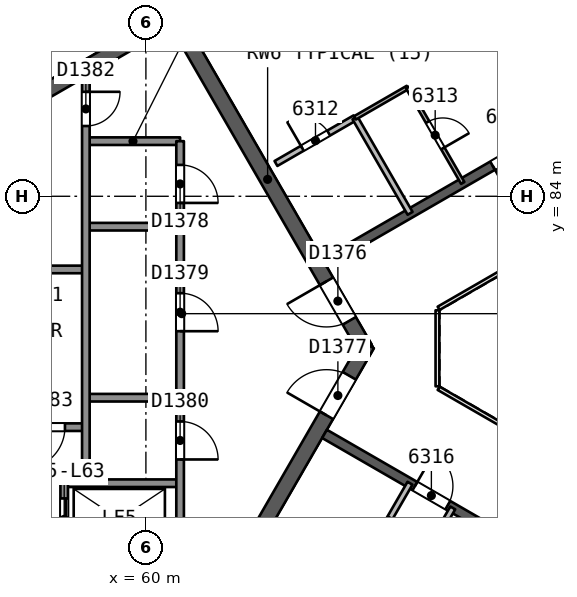
"""IFC4 building model, lengths in metres.
Left out: names, types, materials, properties, quantities, classifications, styles, units other than length and angle.
Written with IfcOpenShell. Run it as: python <this file> out.ifc"""

import sys

from ifc_helpers import new_model, si_unit, direction, frame, frame_2d, origin, place, context, subcontext, project, spatial, rectangle, extrude, element, fill, save


model = new_model("IFC4")
c1 = context("Model", 3, precision=1e-05, world=origin(), true_north=direction((0.0, 1.0)))
c2 = subcontext(c1, "Body", "Model", "MODEL_VIEW")
j1 = project(units=[si_unit("LENGTHUNIT", "METRE"), si_unit("PLANEANGLEUNIT", "RADIAN")], contexts=[c1])
p1 = place(None, origin())
s1 = spatial("IfcSite", under=j1, at=p1, CompositionType="ELEMENT")
p2 = place(p1, origin())
s2 = spatial("IfcBuilding", under=s1, at=p2, CompositionType="ELEMENT")
p3 = place(p2, frame((0.0, 0.0, 259.0)))
s3 = spatial("IfcBuildingStorey", under=s2, at=p3, CompositionType="ELEMENT", Elevation=259.0)
p4 = place(p3, frame((65.769, 80.0, 0.0), z_axis=(0.0, 0.0, 1.0), x_axis=(-0.50000177223, 0.866024380585, 0.0)))
e1 = element("IfcWall", 1, at=p4, inside=s3, PredefinedType="SHEAR", context=c2, shape_type="SweptSolid", body=[
    extrude(rectangle(XDim=10.265, YDim=0.4, at=frame_2d((5.132, 0.0))), origin(), (0.0, 0.0, 1.0), 3.7),
])
p5 = place(p4, frame((0.834, 0.0, 0.0)))
e2 = element("IfcOpeningElement", 2, at=p5, cuts=e1, PredefinedType="OPENING", context=c2, shape_type="SweptSolid", body=[
    extrude(rectangle(XDim=1.2, YDim=2.1, at=frame_2d((0.6, 1.05))), frame((0.0, 0.21, 0.0), z_axis=(0.0, -1.0, 0.0), x_axis=(1.0, 0.0, 0.0)), (0.0, 0.0, 1.0), 0.421),
])
p6 = place(p3, frame((60.737, 88.716, 0.0), z_axis=(0.0, 0.0, 1.0), x_axis=(-0.866028812667, -0.499994095595, 0.0)))
e3 = element("IfcWall", 3, at=p6, inside=s3, PredefinedType="SHEAR", context=c2, shape_type="SweptSolid", body=[
    extrude(rectangle(XDim=14.134, YDim=0.4, at=frame_2d((7.067, 0.0))), origin(), (0.0, 0.0, 1.0), 3.7),
])
p7 = place(p3, frame((48.597, 78.293, 0.0), z_axis=(0.0, 0.0, 1.0), x_axis=(0.866026024469, -0.499998924941, 0.0)))
e4 = element("IfcWall", 4, at=p7, inside=s3, PredefinedType="SHEAR", context=c2, shape_type="SweptSolid", body=[
    extrude(rectangle(XDim=14.218, YDim=0.4, at=frame_2d((7.109, 0.0))), origin(), (0.0, 0.0, 1.0), 3.7),
])
p8 = place(p3, frame((60.737, 71.284, 0.0), z_axis=(0.0, 0.0, 1.0), x_axis=(0.50000547566, 0.866022242388, 0.0)))
e5 = element("IfcWall", 5, at=p8, inside=s3, PredefinedType="SHEAR", context=c2, shape_type="SweptSolid", body=[
    extrude(rectangle(XDim=10.18, YDim=0.4, at=frame_2d((5.09, 0.0))), origin(), (0.0, 0.0, 1.0), 3.7),
])
p9 = place(p8, frame((8.03, 0.0, 0.0)))
e6 = element("IfcOpeningElement", 6, at=p9, cuts=e5, PredefinedType="OPENING", context=c2, shape_type="SweptSolid", body=[
    extrude(rectangle(XDim=1.2, YDim=2.1, at=frame_2d((0.6, 1.05))), frame((0.0, 0.21, 0.0), z_axis=(0.0, -1.0, 0.0), x_axis=(1.0, 0.0, 0.0)), (0.0, 0.0, 1.0), 0.421),
])
p10 = place(p3, frame((78.2, 90.046, 0.0), z_axis=(0.0, 0.0, 1.0), x_axis=(-0.866026492143, -0.499998114903, 0.0)))
e7 = element("IfcWall", 7, at=p10, inside=s3, PredefinedType="SHEAR", context=c2, shape_type="SweptSolid", body=[
    extrude(rectangle(XDim=15.588, YDim=0.25, at=frame_2d((7.794, 0.0))), origin(), (0.0, 0.0, 1.0), 3.3),
])
p11 = place(p10, frame((5.887, 0.0, 0.0)))
e8 = element("IfcOpeningElement", 8, at=p11, cuts=e7, PredefinedType="OPENING", context=c2, shape_type="SweptSolid", body=[
    extrude(rectangle(XDim=1.0, YDim=2.1, at=frame_2d((0.5, 1.05))), frame((0.0, 0.135, 0.0), z_axis=(0.0, -1.0, 0.0), x_axis=(1.0, 0.0, 0.0)), (0.0, 0.0, 1.0), 0.271),
])
p12 = place(p10, frame((9.481, 0.0, 0.0)))
e9 = element("IfcOpeningElement", 9, at=p12, cuts=e7, PredefinedType="OPENING", context=c2, shape_type="SweptSolid", body=[
    extrude(rectangle(XDim=1.0, YDim=2.1, at=frame_2d((0.5, 1.05))), frame((0.0, 0.135, 0.0), z_axis=(0.0, -1.0, 0.0), x_axis=(1.0, 0.0, 0.0)), (0.0, 0.0, 1.0), 0.271),
])
p13 = place(p3, frame((64.7, 77.748, 0.0), z_axis=(0.0, 0.0, 1.0), x_axis=(0.866026492143, -0.499998114903, 0.0)))
e10 = element("IfcWall", 10, at=p13, inside=s3, PredefinedType="SHEAR", context=c2, shape_type="SweptSolid", body=[
    extrude(rectangle(XDim=15.588, YDim=0.25, at=frame_2d((7.794, 0.0))), origin(), (0.0, 0.0, 1.0), 3.3),
])
p14 = place(p13, frame((2.747, 0.0, 0.0)))
e11 = element("IfcOpeningElement", 11, at=p14, cuts=e10, PredefinedType="OPENING", context=c2, shape_type="SweptSolid", body=[
    extrude(rectangle(XDim=1.0, YDim=2.1, at=frame_2d((0.5, 1.05))), frame((0.0, 0.135, 0.0), z_axis=(0.0, -1.0, 0.0), x_axis=(1.0, 0.0, 0.0)), (0.0, 0.0, 1.0), 0.271),
])
p15 = place(p13, frame((6.544, 0.0, 0.0)))
e12 = element("IfcOpeningElement", 12, at=p15, cuts=e10, PredefinedType="OPENING", context=c2, shape_type="SweptSolid", body=[
    extrude(rectangle(XDim=1.0, YDim=2.1, at=frame_2d((0.5, 1.05))), frame((0.0, 0.135, 0.0), z_axis=(0.0, -1.0, 0.0), x_axis=(1.0, 0.0, 0.0)), (0.0, 0.0, 1.0), 0.271),
])
p16 = place(p13, frame((10.441, 0.0, 0.0)))
e13 = element("IfcOpeningElement", 13, at=p16, cuts=e10, PredefinedType="OPENING", context=c2, shape_type="SweptSolid", body=[
    extrude(rectangle(XDim=1.0, YDim=2.1, at=frame_2d((0.5, 1.05))), frame((0.0, 0.135, 0.0), z_axis=(0.0, -1.0, 0.0), x_axis=(1.0, 0.0, 0.0)), (0.0, 0.0, 1.0), 0.271),
])
p17 = place(p13, frame((11.841, 0.0, 0.0)))
e14 = element("IfcOpeningElement", 14, at=p17, cuts=e10, PredefinedType="OPENING", context=c2, shape_type="SweptSolid", body=[
    extrude(rectangle(XDim=1.0, YDim=2.1, at=frame_2d((0.5, 1.05))), frame((0.0, 0.135, 0.0), z_axis=(0.0, -1.0, 0.0), x_axis=(1.0, 0.0, 0.0)), (0.0, 0.0, 1.0), 0.271),
])
p18 = place(p3, frame((65.961, 94.097, 0.0), z_axis=(0.0, 0.0, 1.0), x_axis=(0.499987326052, -0.866032720968, 0.0)))
e15 = element("IfcWall", 15, at=p18, inside=s3, PredefinedType="PARTITIONING", context=c2, shape_type="SweptSolid", body=[
    extrude(rectangle(XDim=9.628, YDim=0.2, at=frame_2d((4.814, 0.0))), origin(), (0.0, 0.0, 1.0), 3.3),
])
p19 = place(p3, frame((63.422, 84.863, 0.0), z_axis=(0.0, 0.0, 1.0), x_axis=(0.865994240961, 0.500053971709, 0.0)))
e16 = element("IfcWall", 16, at=p19, inside=s3, PredefinedType="PARTITIONING", context=c2, shape_type="SweptSolid", body=[
    extrude(rectangle(XDim=2.401, YDim=0.15, at=frame_2d((1.201, 0.0))), origin(), (0.0, 0.0, 1.0), 3.3),
])
p20 = place(p19, frame((0.801, 0.0, 0.0)))
e17 = element("IfcOpeningElement", 17, at=p20, cuts=e16, PredefinedType="OPENING", context=c2, shape_type="SweptSolid", body=[
    extrude(rectangle(XDim=0.8, YDim=2.1, at=frame_2d((0.4, 1.05))), frame((0.0, 0.085, 0.0), z_axis=(0.0, -1.0, 0.0), x_axis=(1.0, 0.0, 0.0)), (0.0, 0.0, 1.0), 0.171),
])
p21 = place(p3, frame((65.502, 86.063, 0.0), z_axis=(0.0, 0.0, 1.0), x_axis=(0.866055983265, 0.499947031044, 0.0)))
e18 = element("IfcWall", 18, at=p21, inside=s3, PredefinedType="PARTITIONING", context=c2, shape_type="SweptSolid", body=[
    extrude(rectangle(XDim=1.6, YDim=0.1, at=frame_2d((0.8, 0.0))), origin(), (0.0, 0.0, 1.0), 3.3),
])
p22 = place(p3, frame((66.887, 86.863, 0.0), z_axis=(0.0, 0.0, 1.0), x_axis=(0.50005036918, -0.865996321171, 0.0)))
e19 = element("IfcWall", 19, at=p22, inside=s3, PredefinedType="PARTITIONING", context=c2, shape_type="SweptSolid", body=[
    extrude(rectangle(XDim=2.9, YDim=0.1, at=frame_2d((1.45, 0.0))), origin(), (0.0, 0.0, 1.0), 3.3),
])
p23 = place(p22, frame((1.05, 0.0, 0.0)))
e20 = element("IfcOpeningElement", 20, at=p23, cuts=e19, PredefinedType="OPENING", context=c2, shape_type="SweptSolid", body=[
    extrude(rectangle(XDim=0.8, YDim=2.1, at=frame_2d((0.4, 1.05))), frame((0.0, 0.061, 0.0), z_axis=(0.0, -1.0, 0.0), x_axis=(1.0, 0.0, 0.0)), (0.0, 0.0, 1.0), 0.121),
])
p24 = place(p3, frame((66.952, 83.552, 0.0), z_axis=(0.0, 0.0, 1.0), x_axis=(-0.499987231761, 0.866032775405, 0.0)))
e21 = element("IfcWall", 21, at=p24, inside=s3, PredefinedType="PARTITIONING", context=c2, shape_type="SweptSolid", body=[
    extrude(rectangle(XDim=2.9, YDim=0.15, at=frame_2d((1.45, 0.0))), origin(), (0.0, 0.0, 1.0), 3.3),
])
p25 = place(p3, frame((66.949, 76.45, 0.0), z_axis=(0.0, 0.0, 1.0), x_axis=(-0.499987231761, -0.866032775405, 0.0)))
e22 = element("IfcWall", 22, at=p25, inside=s3, PredefinedType="PARTITIONING", context=c2, shape_type="SweptSolid", body=[
    extrude(rectangle(XDim=2.9, YDim=0.15, at=frame_2d((1.45, 0.0))), origin(), (0.0, 0.0, 1.0), 3.3),
])
p26 = place(p25, frame((1.05, 0.0, 0.0)))
e23 = element("IfcOpeningElement", 23, at=p26, cuts=e22, PredefinedType="OPENING", context=c2, shape_type="SweptSolid", body=[
    extrude(rectangle(XDim=0.8, YDim=2.1, at=frame_2d((0.4, 1.05))), frame((0.0, 0.085, 0.0), z_axis=(0.0, -1.0, 0.0), x_axis=(1.0, 0.0, 0.0)), (0.0, 0.0, 1.0), 0.171),
])
p27 = place(p3, frame((66.502, 73.076, 0.0), z_axis=(0.0, 0.0, 1.0), x_axis=(0.499995674689, 0.86602790099, 0.0)))
e24 = element("IfcWall", 24, at=p27, inside=s3, PredefinedType="PARTITIONING", context=c2, shape_type="SweptSolid", body=[
    extrude(rectangle(XDim=3.146, YDim=0.15, at=frame_2d((1.573, 0.0))), origin(), (0.0, 0.0, 1.0), 3.3),
])
p28 = place(p3, frame((45.546, 82.482, 0.0), z_axis=(0.0, 0.0, 1.0), x_axis=(0.86602550179, 0.499999830249, 0.0)))
e25 = element("IfcWall", 25, at=p28, inside=s3, PredefinedType="SOLIDWALL", context=c2, shape_type="SweptSolid", body=[
    extrude(rectangle(XDim=48.533, YDim=0.3, at=frame_2d((24.267, 0.0))), origin(), (0.0, 0.0, 1.0), 3.3),
])
p29 = place(p28, frame((34.854, 0.0, 0.0)))
e26 = element("IfcOpeningElement", 26, at=p29, cuts=e25, PredefinedType="OPENING", context=c2, shape_type="SweptSolid", body=[
    extrude(rectangle(XDim=2.4, YDim=2.4, at=frame_2d((1.2, 1.2))), frame((0.0, 0.161, 0.0), z_axis=(0.0, -1.0, 0.0), x_axis=(1.0, 0.0, 0.0)), (0.0, 0.0, 1.0), 0.321),
])
p30 = place(p28, frame((10.5, 0.0, 0.0)))
e27 = element("IfcOpeningElement", 27, at=p30, cuts=e25, PredefinedType="OPENING", context=c2, shape_type="SweptSolid", body=[
    extrude(rectangle(XDim=2.4, YDim=2.4, at=frame_2d((1.2, 1.2))), frame((0.0, 0.161, 0.0), z_axis=(0.0, -1.0, 0.0), x_axis=(1.0, 0.0, 0.0)), (0.0, 0.0, 1.0), 0.321),
])
p31 = place(p3, frame((87.577, 53.251, 0.0), z_axis=(0.0, 0.0, 1.0), x_axis=(-0.86602550179, 0.499999830249, 0.0)))
e28 = element("IfcWall", 28, at=p31, inside=s3, PredefinedType="SOLIDWALL", context=c2, shape_type="SweptSolid", body=[
    extrude(rectangle(XDim=48.533, YDim=0.3, at=frame_2d((24.267, 0.0))), origin(), (0.0, 0.0, 1.0), 3.3),
])
p32 = place(p31, frame((37.192, 0.0, 0.0)))
e29 = element("IfcOpeningElement", 29, at=p32, cuts=e28, PredefinedType="OPENING", context=c2, shape_type="SweptSolid", body=[
    extrude(rectangle(XDim=2.4, YDim=2.4, at=frame_2d((1.2, 1.2))), frame((0.0, 0.161, 0.0), z_axis=(0.0, -1.0, 0.0), x_axis=(1.0, 0.0, 0.0)), (0.0, 0.0, 1.0), 0.321),
])
p33 = place(p31, frame((8.941, 0.0, 0.0)))
e30 = element("IfcOpeningElement", 30, at=p33, cuts=e28, PredefinedType="OPENING", context=c2, shape_type="SweptSolid", body=[
    extrude(rectangle(XDim=2.4, YDim=2.4, at=frame_2d((1.2, 1.2))), frame((0.0, 0.161, 0.0), z_axis=(0.0, -1.0, 0.0), x_axis=(1.0, 0.0, 0.0)), (0.0, 0.0, 1.0), 0.321),
])
p34 = place(p31, frame((25.015, 0.0, 0.0)))
e31 = element("IfcOpeningElement", 31, at=p34, cuts=e28, PredefinedType="OPENING", context=c2, shape_type="SweptSolid", body=[
    extrude(rectangle(XDim=2.4, YDim=2.4, at=frame_2d((1.2, 1.2))), frame((0.0, 0.161, 0.0), z_axis=(0.0, -1.0, 0.0), x_axis=(1.0, 0.0, 0.0)), (0.0, 0.0, 1.0), 0.321),
])
p35 = place(p31, frame((21.118, 0.0, 0.0)))
e32 = element("IfcOpeningElement", 32, at=p35, cuts=e28, PredefinedType="OPENING", context=c2, shape_type="SweptSolid", body=[
    extrude(rectangle(XDim=2.4, YDim=2.4, at=frame_2d((1.2, 1.2))), frame((0.0, 0.161, 0.0), z_axis=(0.0, -1.0, 0.0), x_axis=(1.0, 0.0, 0.0)), (0.0, 0.0, 1.0), 0.321),
])
for number, where, z_axis, x_axis in (
    (33, (60.9, 85.45, 0.0), (0.0, 0.0, 1.0), (-1.0, 0.0, 0.0)),
    (34, (60.9, 83.2, 0.0), (0.0, 0.0, 1.0), (-1.0, 0.0, 0.0)),
):
    element("IfcWall", number, at=place(p3, frame(where, z_axis=z_axis, x_axis=x_axis)), inside=s3, PredefinedType="SOLIDWALL", context=c2, shape_type="SweptSolid", body=[
        extrude(rectangle(XDim=2.48, YDim=0.2, at=frame_2d((1.24, 0.0))), origin(), (0.0, 0.0, 1.0), 3.3),
    ])
p36 = place(p3, frame((58.42, 82.075, 0.0), z_axis=(0.0, 0.0, 1.0), x_axis=(-1.0, 0.0, 0.0)))
e35 = element("IfcWall", 35, at=p36, inside=s3, PredefinedType="SOLIDWALL", context=c2, shape_type="SweptSolid", body=[
    extrude(rectangle(XDim=7.7, YDim=0.2, at=frame_2d((3.85, 0.0))), origin(), (0.0, 0.0, 1.0), 3.3),
])
p37 = place(p3, frame((60.9, 78.7, 0.0), z_axis=(0.0, 0.0, 1.0), x_axis=(-1.0, 0.0, 0.0)))
e36 = element("IfcWall", 36, at=p37, inside=s3, PredefinedType="SOLIDWALL", context=c2, shape_type="SweptSolid", body=[
    extrude(rectangle(XDim=2.48, YDim=0.2, at=frame_2d((1.24, 0.0))), origin(), (0.0, 0.0, 1.0), 3.3),
])
p38 = place(p3, frame((58.42, 77.925, 0.0), z_axis=(0.0, 0.0, 1.0), x_axis=(-1.0, 0.0, 0.0)))
e37 = element("IfcWall", 37, at=p38, inside=s3, PredefinedType="SOLIDWALL", context=c2, shape_type="SweptSolid", body=[
    extrude(rectangle(XDim=7.7, YDim=0.2, at=frame_2d((3.85, 0.0))), origin(), (0.0, 0.0, 1.0), 3.3),
])
p39 = place(p38, frame((0.55, 0.0, 0.0)))
e38 = element("IfcOpeningElement", 38, at=p39, cuts=e37, PredefinedType="OPENING", context=c2, shape_type="SweptSolid", body=[
    extrude(rectangle(XDim=1.1, YDim=2.1, at=frame_2d((0.55, 1.05))), frame((0.0, 0.11, 0.0), z_axis=(0.0, -1.0, 0.0), x_axis=(1.0, 0.0, 0.0)), (0.0, 0.0, 1.0), 0.221),
])
p40 = place(p3, frame((60.9, 76.45, 0.0), z_axis=(0.0, 0.0, 1.0), x_axis=(-1.0, 0.0, 0.0)))
e39 = element("IfcWall", 39, at=p40, inside=s3, PredefinedType="SOLIDWALL", context=c2, shape_type="SweptSolid", body=[
    extrude(rectangle(XDim=3.05, YDim=0.2, at=frame_2d((1.525, 0.0))), origin(), (0.0, 0.0, 1.0), 3.3),
])
p41 = place(p3, frame((60.9, 85.45, 0.0), z_axis=(0.0, 0.0, 1.0), x_axis=(0.0, -1.0, 0.0)))
e40 = element("IfcWall", 40, at=p41, inside=s3, PredefinedType="SOLIDWALL", context=c2, shape_type="SweptSolid", body=[
    extrude(rectangle(XDim=10.9, YDim=0.2, at=frame_2d((5.45, 0.0))), origin(), (0.0, 0.0, 1.0), 3.3),
])
p42 = place(p41, frame((0.625, 0.0, 0.0)))
e41 = element("IfcOpeningElement", 41, at=p42, cuts=e40, PredefinedType="OPENING", context=c2, shape_type="SweptSolid", body=[
    extrude(rectangle(XDim=1.0, YDim=2.1, at=frame_2d((0.5, 1.05))), frame((0.0, 0.11, 0.0), z_axis=(0.0, -1.0, 0.0), x_axis=(1.0, 0.0, 0.0)), (0.0, 0.0, 1.0), 0.221),
])
p43 = place(p41, frame((4.0, 0.0, 0.0)))
e42 = element("IfcOpeningElement", 42, at=p43, cuts=e40, PredefinedType="OPENING", context=c2, shape_type="SweptSolid", body=[
    extrude(rectangle(XDim=1.0, YDim=2.1, at=frame_2d((0.5, 1.05))), frame((0.0, 0.11, 0.0), z_axis=(0.0, -1.0, 0.0), x_axis=(1.0, 0.0, 0.0)), (0.0, 0.0, 1.0), 0.221),
])
p44 = place(p41, frame((7.375, 0.0, 0.0)))
e43 = element("IfcOpeningElement", 43, at=p44, cuts=e40, PredefinedType="OPENING", context=c2, shape_type="SweptSolid", body=[
    extrude(rectangle(XDim=1.0, YDim=2.1, at=frame_2d((0.5, 1.05))), frame((0.0, 0.11, 0.0), z_axis=(0.0, -1.0, 0.0), x_axis=(1.0, 0.0, 0.0)), (0.0, 0.0, 1.0), 0.221),
])
p45 = place(p3, frame((58.42, 87.148, 0.0), z_axis=(0.0, 0.0, 1.0), x_axis=(0.0, -1.0, 0.0)))
e44 = element("IfcWall", 44, at=p45, inside=s3, PredefinedType="SOLIDWALL", context=c2, shape_type="SweptSolid", body=[
    extrude(rectangle(XDim=10.698, YDim=0.2, at=frame_2d((5.349, 0.0))), origin(), (0.0, 0.0, 1.0), 3.3),
])
p46 = place(p45, frame((0.399, 0.0, 0.0)))
e45 = element("IfcOpeningElement", 45, at=p46, cuts=e44, PredefinedType="OPENING", context=c2, shape_type="SweptSolid", body=[
    extrude(rectangle(XDim=0.9, YDim=2.1, at=frame_2d((0.45, 1.05))), frame((0.0, 0.11, 0.0), z_axis=(0.0, -1.0, 0.0), x_axis=(1.0, 0.0, 0.0)), (0.0, 0.0, 1.0), 0.221),
])
p47 = place(p3, frame((57.85, 76.45, 0.0), z_axis=(0.0, 0.0, 1.0), x_axis=(0.0, -1.0, 0.0)))
e46 = element("IfcWall", 46, at=p47, inside=s3, PredefinedType="SOLIDWALL", context=c2, shape_type="SweptSolid", body=[
    extrude(rectangle(XDim=1.9, YDim=0.2, at=frame_2d((0.95, 0.0))), origin(), (0.0, 0.0, 1.0), 3.3),
])
p48 = place(p47, frame((0.4, 0.0, 0.0)))
e47 = element("IfcOpeningElement", 47, at=p48, cuts=e46, PredefinedType="OPENING", context=c2, shape_type="SweptSolid", body=[
    extrude(rectangle(XDim=1.1, YDim=2.1, at=frame_2d((0.55, 1.05))), frame((0.0, 0.11, 0.0), z_axis=(0.0, -1.0, 0.0), x_axis=(1.0, 0.0, 0.0)), (0.0, 0.0, 1.0), 0.221),
])
p49 = place(p3, frame((77.738, 86.846, 0.0), z_axis=(0.0, 0.0, 1.0), x_axis=(-0.866026658274, -0.499997827154, 0.0)))
e48 = element("IfcWall", 48, at=p49, inside=s3, PredefinedType="PARTITIONING", context=c2, shape_type="SweptSolid", body=[
    extrude(rectangle(XDim=11.588, YDim=0.1, at=frame_2d((5.794, 0.0))), origin(), (0.0, 0.0, 1.0), 3.3),
])
p50 = place(p3, frame((67.672, 81.0, 0.0), z_axis=(0.0, 0.0, 1.0), x_axis=(0.0, -1.0, 0.0)))
e49 = element("IfcWall", 49, at=p50, inside=s3, PredefinedType="PARTITIONING", context=c2, shape_type="SweptSolid", body=[
    extrude(rectangle(XDim=2.0, YDim=0.1, at=frame_2d((1.0, 0.0))), origin(), (0.0, 0.0, 1.0), 3.3),
])
p51 = place(p3, frame((67.702, 78.948, 0.0), z_axis=(0.0, 0.0, 1.0), x_axis=(0.866026658274, -0.499997827154, 0.0)))
e50 = element("IfcWall", 50, at=p51, inside=s3, PredefinedType="PARTITIONING", context=c2, shape_type="SweptSolid", body=[
    extrude(rectangle(XDim=11.588, YDim=0.1, at=frame_2d((5.794, 0.0))), origin(), (0.0, 0.0, 1.0), 3.3),
])
p52 = place(p20, origin())
e51 = element("IfcDoor", 51, at=p52, inside=s3, OperationType="SINGLE_SWING_LEFT", PredefinedType="NOTDEFINED", context=c2, shape_type="SweptSolid", body=[
    extrude(rectangle(XDim=0.8, YDim=2.1, at=frame_2d((0.4, 1.05))), frame((0.0, 0.025, 0.0), z_axis=(0.0, -1.0, 0.0), x_axis=(1.0, 0.0, 0.0)), (0.0, 0.0, 1.0), 0.05),
])
fill(e17, e51)
p53 = place(p23, origin())
e52 = element("IfcDoor", 52, at=p53, inside=s3, OperationType="SINGLE_SWING_RIGHT", PredefinedType="NOTDEFINED", context=c2, shape_type="SweptSolid", body=[
    extrude(rectangle(XDim=0.8, YDim=2.1, at=frame_2d((0.4, 1.05))), frame((0.0, 0.025, 0.0), z_axis=(0.0, -1.0, 0.0), x_axis=(1.0, 0.0, 0.0)), (0.0, 0.0, 1.0), 0.05),
])
fill(e20, e52)
p54 = place(p12, origin())
e53 = element("IfcDoor", 53, at=p54, inside=s3, OperationType="SINGLE_SWING_RIGHT", PredefinedType="NOTDEFINED", context=c2, shape_type="SweptSolid", body=[
    extrude(rectangle(XDim=1.0, YDim=2.1, at=frame_2d((0.5, 1.05))), frame((0.0, 0.025, 0.0), z_axis=(0.0, -1.0, 0.0), x_axis=(1.0, 0.0, 0.0)), (0.0, 0.0, 1.0), 0.05),
])
fill(e9, e53)
p55 = place(p26, origin())
e54 = element("IfcDoor", 54, at=p55, inside=s3, OperationType="SINGLE_SWING_RIGHT", PredefinedType="NOTDEFINED", context=c2, shape_type="SweptSolid", body=[
    extrude(rectangle(XDim=0.8, YDim=2.1, at=frame_2d((0.4, 1.05))), frame((0.0, 0.025, 0.0), z_axis=(0.0, -1.0, 0.0), x_axis=(1.0, 0.0, 0.0)), (0.0, 0.0, 1.0), 0.05),
])
fill(e23, e54)
p56 = place(p14, origin())
e55 = element("IfcDoor", 55, at=p56, inside=s3, OperationType="SINGLE_SWING_LEFT", PredefinedType="NOTDEFINED", context=c2, shape_type="SweptSolid", body=[
    extrude(rectangle(XDim=1.0, YDim=2.1, at=frame_2d((0.5, 1.05))), frame((0.0, 0.025, 0.0), z_axis=(0.0, -1.0, 0.0), x_axis=(1.0, 0.0, 0.0)), (0.0, 0.0, 1.0), 0.05),
])
fill(e11, e55)
p57 = place(p5, origin())
e56 = element("IfcDoor", 56, at=p57, inside=s3, OperationType="SINGLE_SWING_RIGHT", PredefinedType="NOTDEFINED", context=c2, shape_type="SweptSolid", body=[
    extrude(rectangle(XDim=1.2, YDim=2.1, at=frame_2d((0.6, 1.05))), frame((0.0, 0.025, 0.0), z_axis=(0.0, -1.0, 0.0), x_axis=(1.0, 0.0, 0.0)), (0.0, 0.0, 1.0), 0.05),
])
fill(e2, e56)
p58 = place(p9, origin())
e57 = element("IfcDoor", 57, at=p58, inside=s3, OperationType="SINGLE_SWING_LEFT", PredefinedType="NOTDEFINED", context=c2, shape_type="SweptSolid", body=[
    extrude(rectangle(XDim=1.2, YDim=2.1, at=frame_2d((0.6, 1.05))), frame((0.0, 0.025, 0.0), z_axis=(0.0, -1.0, 0.0), x_axis=(1.0, 0.0, 0.0)), (0.0, 0.0, 1.0), 0.05),
])
fill(e6, e57)
p59 = place(p48, origin())
e58 = element("IfcDoor", 58, at=p59, inside=s3, OperationType="SLIDING_TO_RIGHT", PredefinedType="NOTDEFINED", context=c2, shape_type="SweptSolid", body=[
    extrude(rectangle(XDim=1.1, YDim=2.1, at=frame_2d((0.55, 1.05))), frame((0.0, 0.025, 0.0), z_axis=(0.0, -1.0, 0.0), x_axis=(1.0, 0.0, 0.0)), (0.0, 0.0, 1.0), 0.05),
])
fill(e47, e58)
p60 = place(p42, origin())
e59 = element("IfcDoor", 59, at=p60, inside=s3, OperationType="SINGLE_SWING_RIGHT", PredefinedType="NOTDEFINED", context=c2, shape_type="SweptSolid", body=[
    extrude(rectangle(XDim=1.0, YDim=2.1, at=frame_2d((0.5, 1.05))), frame((0.0, 0.025, 0.0), z_axis=(0.0, -1.0, 0.0), x_axis=(1.0, 0.0, 0.0)), (0.0, 0.0, 1.0), 0.05),
])
fill(e41, e59)
p61 = place(p43, origin())
e60 = element("IfcDoor", 60, at=p61, inside=s3, OperationType="SINGLE_SWING_RIGHT", PredefinedType="NOTDEFINED", context=c2, shape_type="SweptSolid", body=[
    extrude(rectangle(XDim=1.0, YDim=2.1, at=frame_2d((0.5, 1.05))), frame((0.0, 0.025, 0.0), z_axis=(0.0, -1.0, 0.0), x_axis=(1.0, 0.0, 0.0)), (0.0, 0.0, 1.0), 0.05),
])
fill(e42, e60)
p62 = place(p44, origin())
e61 = element("IfcDoor", 61, at=p62, inside=s3, OperationType="SINGLE_SWING_RIGHT", PredefinedType="NOTDEFINED", context=c2, shape_type="SweptSolid", body=[
    extrude(rectangle(XDim=1.0, YDim=2.1, at=frame_2d((0.5, 1.05))), frame((0.0, 0.025, 0.0), z_axis=(0.0, -1.0, 0.0), x_axis=(1.0, 0.0, 0.0)), (0.0, 0.0, 1.0), 0.05),
])
fill(e43, e61)
p63 = place(p46, origin())
e62 = element("IfcDoor", 62, at=p63, inside=s3, OperationType="SINGLE_SWING_LEFT", PredefinedType="NOTDEFINED", context=c2, shape_type="SweptSolid", body=[
    extrude(rectangle(XDim=0.9, YDim=2.1, at=frame_2d((0.45, 1.05))), frame((0.0, 0.025, 0.0), z_axis=(0.0, -1.0, 0.0), x_axis=(1.0, 0.0, 0.0)), (0.0, 0.0, 1.0), 0.05),
])
fill(e45, e62)
p64 = place(p39, origin())
e63 = element("IfcDoor", 63, at=p64, inside=s3, OperationType="SINGLE_SWING_RIGHT", PredefinedType="NOTDEFINED", context=c2, shape_type="SweptSolid", body=[
    extrude(rectangle(XDim=1.1, YDim=2.1, at=frame_2d((0.55, 1.05))), frame((0.0, 0.025, 0.0), z_axis=(0.0, -1.0, 0.0), x_axis=(1.0, 0.0, 0.0)), (0.0, 0.0, 1.0), 0.05),
])
fill(e38, e63)
save(model, sys.argv[1])
